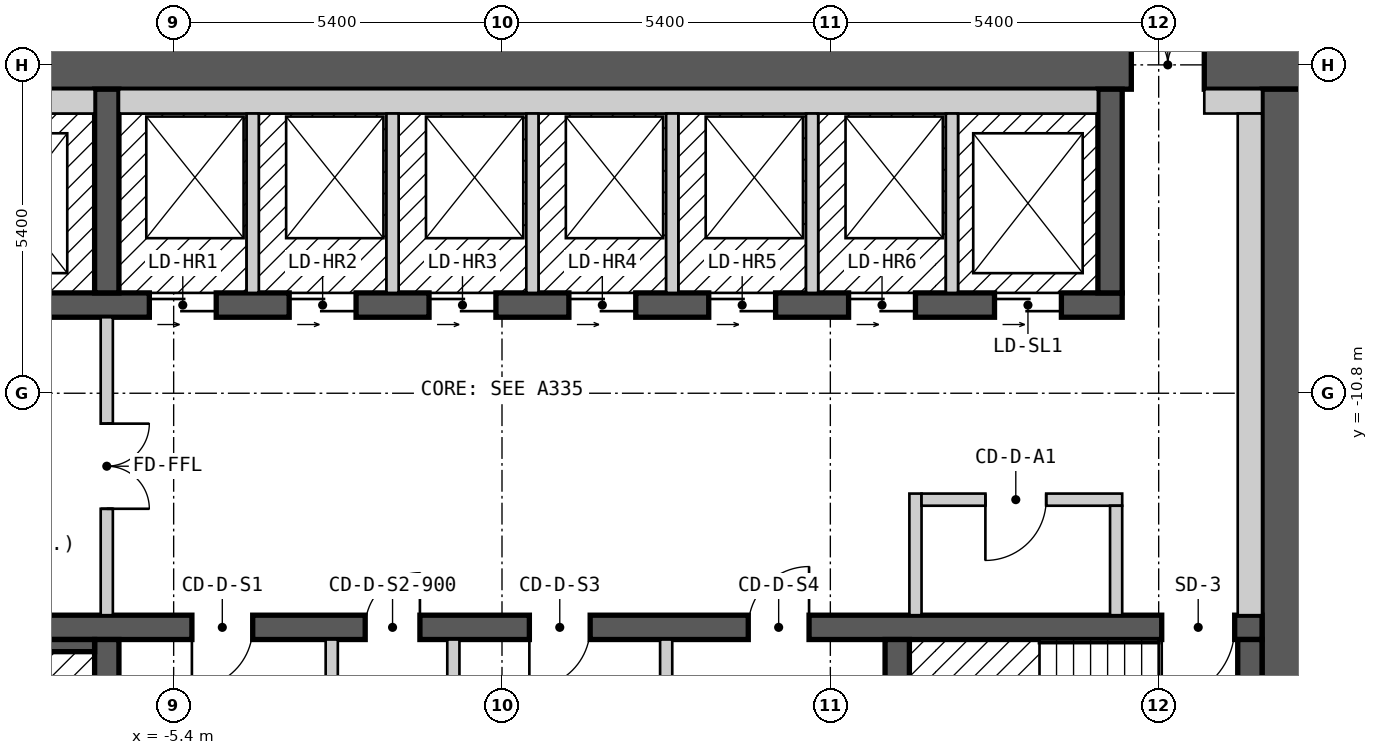
"""IFC4 building model, lengths in metres.
Left out: names, types, materials, properties, quantities, classifications, styles, units other than length and angle.
Written with IfcOpenShell. Run it as: python <this file> out.ifc"""

import sys

from ifc_helpers import new_model, si_unit, direction, frame, frame_2d, origin, place, context, subcontext, project, spatial, rectangle, extrude, element, fill, save


model = new_model("IFC4")
c1 = context("Model", 3, precision=1e-05, world=origin(), true_north=direction((0.0, 1.0)))
c2 = subcontext(c1, "Body", "Model", "MODEL_VIEW")
j1 = project(units=[si_unit("LENGTHUNIT", "METRE"), si_unit("PLANEANGLEUNIT", "RADIAN")], contexts=[c1])
p1 = place(None, origin())
s1 = spatial("IfcSite", under=j1, at=p1, CompositionType="ELEMENT")
p2 = place(p1, origin())
s2 = spatial("IfcBuilding", under=s1, at=p2, CompositionType="ELEMENT")
p3 = place(p2, frame((0.0, 0.0, 126.6)))
s3 = spatial("IfcBuildingStorey", under=s2, at=p3, CompositionType="ELEMENT", Elevation=126.6)
p4 = place(p3, frame((-13.3, -5.4, 0.0), z_axis=(0.0, 0.0, 1.0), x_axis=(1.0, 0.0, 0.0)))
e1 = element("IfcWall", 1, at=p4, inside=s3, PredefinedType="SHEAR", context=c2, shape_type="SweptSolid", body=[
    extrude(rectangle(XDim=26.6, YDim=0.8, at=frame_2d((13.3, 0.0))), origin(), (0.0, 0.0, 1.0), 2.7),
])
p5 = place(p4, frame((23.65, 0.0, 0.0)))
e2 = element("IfcOpeningElement", 2, at=p5, cuts=e1, PredefinedType="OPENING", context=c2, shape_type="SweptSolid", body=[
    extrude(rectangle(XDim=1.2, YDim=2.1, at=frame_2d((0.6, 1.05))), frame((0.0, 0.41, 0.0), z_axis=(0.0, -1.0, 0.0), x_axis=(1.0, 0.0, 0.0)), (0.0, 0.0, 1.0), 0.82),
])
p6 = place(p3, frame((12.9, -18.2, 0.0), z_axis=(0.0, 0.0, 1.0), x_axis=(0.0, 1.0, 0.0)))
e3 = element("IfcWall", 3, at=p6, inside=s3, PredefinedType="SHEAR", context=c2, shape_type="SweptSolid", body=[
    extrude(rectangle(XDim=12.4, YDim=0.8, at=frame_2d((6.2, 0.0))), origin(), (0.0, 0.0, 1.0), 2.7),
])
p7 = place(p3, frame((-12.5, -14.65, 0.0), z_axis=(0.0, 0.0, 1.0), x_axis=(1.0, 0.0, 0.0)))
e4 = element("IfcWall", 4, at=p7, inside=s3, PredefinedType="SHEAR", context=c2, shape_type="SweptSolid", body=[
    extrude(rectangle(XDim=25.0, YDim=0.4, at=frame_2d((12.5, 0.0))), origin(), (0.0, 0.0, 1.0), 2.7),
])
p8 = place(p7, frame((1.7, 0.0, 0.0), z_axis=(0.0, 0.0, 1.0), x_axis=(-1.0, 0.0, 0.0)))
e5 = element("IfcOpeningElement", 5, at=p8, cuts=e4, PredefinedType="OPENING", context=c2, shape_type="SweptSolid", body=[
    extrude(rectangle(XDim=1.2, YDim=2.1, at=frame_2d((0.6, 1.05))), frame((0.0, 0.21, 0.0), z_axis=(0.0, -1.0, 0.0), x_axis=(1.0, 0.0, 0.0)), (0.0, 0.0, 1.0), 0.42),
])
p9 = place(p7, frame((24.55, 0.0, 0.0), z_axis=(0.0, 0.0, 1.0), x_axis=(-1.0, 0.0, 0.0)))
e6 = element("IfcOpeningElement", 6, at=p9, cuts=e4, PredefinedType="OPENING", context=c2, shape_type="SweptSolid", body=[
    extrude(rectangle(XDim=1.2, YDim=2.1, at=frame_2d((0.6, 1.05))), frame((0.0, 0.21, 0.0), z_axis=(0.0, -1.0, 0.0), x_axis=(1.0, 0.0, 0.0)), (0.0, 0.0, 1.0), 0.42),
])
p10 = place(p7, frame((8.4, 0.0, 0.0), z_axis=(0.0, 0.0, 1.0), x_axis=(-1.0, 0.0, 0.0)))
e7 = element("IfcOpeningElement", 7, at=p10, cuts=e4, PredefinedType="OPENING", context=c2, shape_type="SweptSolid", body=[
    extrude(rectangle(XDim=1.0, YDim=2.1, at=frame_2d((0.5, 1.05))), frame((0.0, 0.21, 0.0), z_axis=(0.0, -1.0, 0.0), x_axis=(1.0, 0.0, 0.0)), (0.0, 0.0, 1.0), 0.42),
])
p11 = place(p7, frame((11.15, 0.0, 0.0), z_axis=(0.0, 0.0, 1.0), x_axis=(-1.0, 0.0, 0.0)))
e8 = element("IfcOpeningElement", 8, at=p11, cuts=e4, PredefinedType="OPENING", context=c2, shape_type="SweptSolid", body=[
    extrude(rectangle(XDim=0.9, YDim=2.1, at=frame_2d((0.45, 1.05))), frame((0.0, 0.21, 0.0), z_axis=(0.0, -1.0, 0.0), x_axis=(1.0, 0.0, 0.0)), (0.0, 0.0, 1.0), 0.42),
])
p12 = place(p7, frame((13.95, 0.0, 0.0), z_axis=(0.0, 0.0, 1.0), x_axis=(-1.0, 0.0, 0.0)))
e9 = element("IfcOpeningElement", 9, at=p12, cuts=e4, PredefinedType="OPENING", context=c2, shape_type="SweptSolid", body=[
    extrude(rectangle(XDim=1.0, YDim=2.1, at=frame_2d((0.5, 1.05))), frame((0.0, 0.21, 0.0), z_axis=(0.0, -1.0, 0.0), x_axis=(1.0, 0.0, 0.0)), (0.0, 0.0, 1.0), 0.42),
])
p13 = place(p7, frame((17.55, 0.0, 0.0), z_axis=(0.0, 0.0, 1.0), x_axis=(-1.0, 0.0, 0.0)))
e10 = element("IfcOpeningElement", 10, at=p13, cuts=e4, PredefinedType="OPENING", context=c2, shape_type="SweptSolid", body=[
    extrude(rectangle(XDim=1.0, YDim=2.1, at=frame_2d((0.5, 1.05))), frame((0.0, 0.21, 0.0), z_axis=(0.0, -1.0, 0.0), x_axis=(1.0, 0.0, 0.0)), (0.0, 0.0, 1.0), 0.42),
])
p14 = place(p3, frame((-12.5, -9.35, 0.0), z_axis=(0.0, 0.0, 1.0), x_axis=(1.0, 0.0, 0.0)))
e11 = element("IfcWall", 11, at=p14, inside=s3, PredefinedType="SHEAR", context=c2, shape_type="SweptSolid", body=[
    extrude(rectangle(XDim=22.7, YDim=0.4, at=frame_2d((11.35, 0.0))), origin(), (0.0, 0.0, 1.0), 2.7),
])
p15 = place(p14, frame((1.1, 0.0, 0.0)))
e12 = element("IfcOpeningElement", 12, at=p15, cuts=e11, PredefinedType="OPENING", context=c2, shape_type="SweptSolid", body=[
    extrude(rectangle(XDim=1.1, YDim=2.1, at=frame_2d((0.55, 1.05))), frame((0.0, 0.21, 0.0), z_axis=(0.0, -1.0, 0.0), x_axis=(1.0, 0.0, 0.0)), (0.0, 0.0, 1.0), 0.42),
])
p16 = place(p14, frame((3.9, 0.0, 0.0)))
e13 = element("IfcOpeningElement", 13, at=p16, cuts=e11, PredefinedType="OPENING", context=c2, shape_type="SweptSolid", body=[
    extrude(rectangle(XDim=1.1, YDim=2.1, at=frame_2d((0.55, 1.05))), frame((0.0, 0.21, 0.0), z_axis=(0.0, -1.0, 0.0), x_axis=(1.0, 0.0, 0.0)), (0.0, 0.0, 1.0), 0.42),
])
p17 = place(p14, frame((6.7, 0.0, 0.0)))
e14 = element("IfcOpeningElement", 14, at=p17, cuts=e11, PredefinedType="OPENING", context=c2, shape_type="SweptSolid", body=[
    extrude(rectangle(XDim=1.1, YDim=2.1, at=frame_2d((0.55, 1.05))), frame((0.0, 0.21, 0.0), z_axis=(0.0, -1.0, 0.0), x_axis=(1.0, 0.0, 0.0)), (0.0, 0.0, 1.0), 0.42),
])
p18 = place(p14, frame((9.0, 0.0, 0.0)))
e15 = element("IfcOpeningElement", 15, at=p18, cuts=e11, PredefinedType="OPENING", context=c2, shape_type="SweptSolid", body=[
    extrude(rectangle(XDim=1.1, YDim=2.1, at=frame_2d((0.55, 1.05))), frame((0.0, 0.21, 0.0), z_axis=(0.0, -1.0, 0.0), x_axis=(1.0, 0.0, 0.0)), (0.0, 0.0, 1.0), 0.42),
])
p19 = place(p14, frame((11.3, 0.0, 0.0)))
e16 = element("IfcOpeningElement", 16, at=p19, cuts=e11, PredefinedType="OPENING", context=c2, shape_type="SweptSolid", body=[
    extrude(rectangle(XDim=1.1, YDim=2.1, at=frame_2d((0.55, 1.05))), frame((0.0, 0.21, 0.0), z_axis=(0.0, -1.0, 0.0), x_axis=(1.0, 0.0, 0.0)), (0.0, 0.0, 1.0), 0.42),
])
p20 = place(p14, frame((13.6, 0.0, 0.0)))
e17 = element("IfcOpeningElement", 17, at=p20, cuts=e11, PredefinedType="OPENING", context=c2, shape_type="SweptSolid", body=[
    extrude(rectangle(XDim=1.1, YDim=2.1, at=frame_2d((0.55, 1.05))), frame((0.0, 0.21, 0.0), z_axis=(0.0, -1.0, 0.0), x_axis=(1.0, 0.0, 0.0)), (0.0, 0.0, 1.0), 0.42),
])
p21 = place(p14, frame((15.9, 0.0, 0.0)))
e18 = element("IfcOpeningElement", 18, at=p21, cuts=e11, PredefinedType="OPENING", context=c2, shape_type="SweptSolid", body=[
    extrude(rectangle(XDim=1.1, YDim=2.1, at=frame_2d((0.55, 1.05))), frame((0.0, 0.21, 0.0), z_axis=(0.0, -1.0, 0.0), x_axis=(1.0, 0.0, 0.0)), (0.0, 0.0, 1.0), 0.42),
])
p22 = place(p14, frame((18.2, 0.0, 0.0)))
e19 = element("IfcOpeningElement", 19, at=p22, cuts=e11, PredefinedType="OPENING", context=c2, shape_type="SweptSolid", body=[
    extrude(rectangle(XDim=1.1, YDim=2.1, at=frame_2d((0.55, 1.05))), frame((0.0, 0.21, 0.0), z_axis=(0.0, -1.0, 0.0), x_axis=(1.0, 0.0, 0.0)), (0.0, 0.0, 1.0), 0.42),
])
p23 = place(p14, frame((20.6, 0.0, 0.0)))
e20 = element("IfcOpeningElement", 20, at=p23, cuts=e11, PredefinedType="OPENING", context=c2, shape_type="SweptSolid", body=[
    extrude(rectangle(XDim=1.1, YDim=2.1, at=frame_2d((0.55, 1.05))), frame((0.0, 0.21, 0.0), z_axis=(0.0, -1.0, 0.0), x_axis=(1.0, 0.0, 0.0)), (0.0, 0.0, 1.0), 0.42),
])
for number, where, z_axis, x_axis in (
    (21, (-6.5, -18.2, 0.0), (0.0, 0.0, 1.0), (0.0, 1.0, 0.0)),
    (22, (6.5, -18.2, 0.0), (0.0, 0.0, 1.0), (0.0, 1.0, 0.0)),
    (23, (-6.5, -9.15, 0.0), (0.0, 0.0, 1.0), (0.0, 1.0, 0.0)),
    (24, (10.0, -9.15, 0.0), (0.0, 0.0, 1.0), (0.0, 1.0, 0.0)),
):
    element("IfcWall", number, at=place(p3, frame(where, z_axis=z_axis, x_axis=x_axis)), inside=s3, PredefinedType="SHEAR", context=c2, shape_type="SweptSolid", body=[
        extrude(rectangle(XDim=3.35, YDim=0.4, at=frame_2d((1.675, 0.0))), origin(), (0.0, 0.0, 1.0), 2.7),
    ])
p24 = place(p3, frame((-12.1, -6.0, 0.0), z_axis=(0.0, 0.0, 1.0), x_axis=(1.0, 0.0, 0.0)))
e25 = element("IfcWall", 25, at=p24, inside=s3, PredefinedType="SOLIDWALL", context=c2, shape_type="SweptSolid", body=[
    extrude(rectangle(XDim=5.4, YDim=0.4, at=frame_2d((2.7, 0.0))), origin(), (0.0, 0.0, 1.0), 2.7),
])
p25 = place(p3, frame((-10.8, -14.95, 0.0), z_axis=(0.0, 0.0, 1.0), x_axis=(1.0, 0.0, 0.0)))
e26 = element("IfcWall", 26, at=p25, inside=s3, PredefinedType="SOLIDWALL", context=c2, shape_type="SweptSolid", body=[
    extrude(rectangle(XDim=4.1, YDim=0.2, at=frame_2d((2.05, 0.0))), origin(), (0.0, 0.0, 1.0), 2.7),
])
p26 = place(p3, frame((-6.5, -14.45, 0.0), z_axis=(0.0, 0.0, 1.0), x_axis=(0.0, 1.0, 0.0)))
e27 = element("IfcWall", 27, at=p26, inside=s3, PredefinedType="PARTITIONING", context=c2, shape_type="SweptSolid", body=[
    extrude(rectangle(XDim=4.9, YDim=0.2, at=frame_2d((2.45, 0.0))), origin(), (0.0, 0.0, 1.0), 2.7),
])
p27 = place(p26, frame((3.15, 0.0, 0.0), z_axis=(0.0, 0.0, 1.0), x_axis=(-1.0, 0.0, 0.0)))
e28 = element("IfcOpeningElement", 28, at=p27, cuts=e27, PredefinedType="OPENING", context=c2, shape_type="SweptSolid", body=[
    extrude(rectangle(XDim=1.4, YDim=2.1, at=frame_2d((0.7, 1.05))), frame((0.0, 0.11, 0.0), z_axis=(0.0, -1.0, 0.0), x_axis=(1.0, 0.0, 0.0)), (0.0, 0.0, 1.0), 0.22),
])
p28 = place(p3, frame((-6.3, -6.0, 0.0), z_axis=(0.0, 0.0, 1.0), x_axis=(1.0, 0.0, 0.0)))
e29 = element("IfcWall", 29, at=p28, inside=s3, PredefinedType="SOLIDWALL", context=c2, shape_type="SweptSolid", body=[
    extrude(rectangle(XDim=16.1, YDim=0.4, at=frame_2d((8.05, 0.0))), origin(), (0.0, 0.0, 1.0), 2.7),
])
p29 = place(p3, frame((-4.1, -9.15, 0.0), z_axis=(0.0, 0.0, 1.0), x_axis=(0.0, 1.0, 0.0)))
e30 = element("IfcWall", 30, at=p29, inside=s3, PredefinedType="SOLIDWALL", context=c2, shape_type="SweptSolid", body=[
    extrude(rectangle(XDim=2.95, YDim=0.2, at=frame_2d((1.475, 0.0))), origin(), (0.0, 0.0, 1.0), 2.7),
])
p30 = place(p3, frame((-2.8, -17.8, 0.0), z_axis=(0.0, 0.0, 1.0), x_axis=(0.0, 1.0, 0.0)))
e31 = element("IfcWall", 31, at=p30, inside=s3, PredefinedType="PARTITIONING", context=c2, shape_type="SweptSolid", body=[
    extrude(rectangle(XDim=2.95, YDim=0.2, at=frame_2d((1.475, 0.0))), origin(), (0.0, 0.0, 1.0), 2.7),
])
p31 = place(p3, frame((-1.8, -9.15, 0.0), z_axis=(0.0, 0.0, 1.0), x_axis=(0.0, 1.0, 0.0)))
e32 = element("IfcWall", 32, at=p31, inside=s3, PredefinedType="SOLIDWALL", context=c2, shape_type="SweptSolid", body=[
    extrude(rectangle(XDim=2.95, YDim=0.2, at=frame_2d((1.475, 0.0))), origin(), (0.0, 0.0, 1.0), 2.7),
])
p32 = place(p3, frame((-0.8, -17.8, 0.0), z_axis=(0.0, 0.0, 1.0), x_axis=(0.0, 1.0, 0.0)))
e33 = element("IfcWall", 33, at=p32, inside=s3, PredefinedType="PARTITIONING", context=c2, shape_type="SweptSolid", body=[
    extrude(rectangle(XDim=2.95, YDim=0.2, at=frame_2d((1.475, 0.0))), origin(), (0.0, 0.0, 1.0), 2.7),
])
p33 = place(p3, frame((0.5, -9.15, 0.0), z_axis=(0.0, 0.0, 1.0), x_axis=(0.0, 1.0, 0.0)))
e34 = element("IfcWall", 34, at=p33, inside=s3, PredefinedType="SOLIDWALL", context=c2, shape_type="SweptSolid", body=[
    extrude(rectangle(XDim=2.95, YDim=0.2, at=frame_2d((1.475, 0.0))), origin(), (0.0, 0.0, 1.0), 2.7),
])
p34 = place(p3, frame((2.7, -17.8, 0.0), z_axis=(0.0, 0.0, 1.0), x_axis=(0.0, 1.0, 0.0)))
e35 = element("IfcWall", 35, at=p34, inside=s3, PredefinedType="PARTITIONING", context=c2, shape_type="SweptSolid", body=[
    extrude(rectangle(XDim=2.95, YDim=0.2, at=frame_2d((1.475, 0.0))), origin(), (0.0, 0.0, 1.0), 2.7),
])
for number, where, z_axis, x_axis in (
    (36, (2.8, -9.15, 0.0), (0.0, 0.0, 1.0), (0.0, 1.0, 0.0)),
    (37, (5.1, -9.15, 0.0), (0.0, 0.0, 1.0), (0.0, 1.0, 0.0)),
):
    element("IfcWall", number, at=place(p3, frame(where, z_axis=z_axis, x_axis=x_axis)), inside=s3, PredefinedType="SOLIDWALL", context=c2, shape_type="SweptSolid", body=[
        extrude(rectangle(XDim=2.95, YDim=0.2, at=frame_2d((1.475, 0.0))), origin(), (0.0, 0.0, 1.0), 2.7),
    ])
p35 = place(p3, frame((6.8, -14.45, 0.0), z_axis=(0.0, 0.0, 1.0), x_axis=(0.0, 1.0, 0.0)))
e38 = element("IfcWall", 38, at=p35, inside=s3, PredefinedType="PARTITIONING", context=c2, shape_type="SweptSolid", body=[
    extrude(rectangle(XDim=2.0, YDim=0.2, at=frame_2d((1.0, 0.0))), origin(), (0.0, 0.0, 1.0), 2.7),
])
p36 = place(p3, frame((6.9, -12.55, 0.0), z_axis=(0.0, 0.0, 1.0), x_axis=(1.0, 0.0, 0.0)))
e39 = element("IfcWall", 39, at=p36, inside=s3, PredefinedType="PARTITIONING", context=c2, shape_type="SweptSolid", body=[
    extrude(rectangle(XDim=3.3, YDim=0.2, at=frame_2d((1.65, 0.0))), origin(), (0.0, 0.0, 1.0), 2.7),
])
p37 = place(p36, frame((2.05, 0.0, 0.0), z_axis=(0.0, 0.0, 1.0), x_axis=(-1.0, 0.0, 0.0)))
e40 = element("IfcOpeningElement", 40, at=p37, cuts=e39, PredefinedType="OPENING", context=c2, shape_type="SweptSolid", body=[
    extrude(rectangle(XDim=1.0, YDim=2.1, at=frame_2d((0.5, 1.05))), frame((0.0, 0.11, 0.0), z_axis=(0.0, -1.0, 0.0), x_axis=(1.0, 0.0, 0.0)), (0.0, 0.0, 1.0), 0.22),
])
p38 = place(p3, frame((7.4, -9.15, 0.0), z_axis=(0.0, 0.0, 1.0), x_axis=(0.0, 1.0, 0.0)))
e41 = element("IfcWall", 41, at=p38, inside=s3, PredefinedType="SOLIDWALL", context=c2, shape_type="SweptSolid", body=[
    extrude(rectangle(XDim=2.95, YDim=0.2, at=frame_2d((1.475, 0.0))), origin(), (0.0, 0.0, 1.0), 2.7),
])
p39 = place(p3, frame((10.1, -14.45, 0.0), z_axis=(0.0, 0.0, 1.0), x_axis=(0.0, 1.0, 0.0)))
e42 = element("IfcWall", 42, at=p39, inside=s3, PredefinedType="PARTITIONING", context=c2, shape_type="SweptSolid", body=[
    extrude(rectangle(XDim=1.8, YDim=0.2, at=frame_2d((0.9, 0.0))), origin(), (0.0, 0.0, 1.0), 2.7),
])
p40 = place(p3, frame((11.55, -6.0, 0.0), z_axis=(0.0, 0.0, 1.0), x_axis=(1.0, 0.0, 0.0)))
e43 = element("IfcWall", 43, at=p40, inside=s3, PredefinedType="PARTITIONING", context=c2, shape_type="SweptSolid", body=[
    extrude(rectangle(XDim=0.95, YDim=0.4, at=frame_2d((0.475, 0.0))), origin(), (0.0, 0.0, 1.0), 2.7),
])
p41 = place(p3, frame((12.3, -17.6, 0.0), z_axis=(0.0, 0.0, 1.0), x_axis=(0.0, 1.0, 0.0)))
e44 = element("IfcWall", 44, at=p41, inside=s3, PredefinedType="SOLIDWALL", context=c2, shape_type="SweptSolid", body=[
    extrude(rectangle(XDim=2.75, YDim=0.4, at=frame_2d((1.375, 0.0))), origin(), (0.0, 0.0, 1.0), 2.7),
])
p42 = place(p3, frame((12.3, -14.45, 0.0), z_axis=(0.0, 0.0, 1.0), x_axis=(0.0, 1.0, 0.0)))
e45 = element("IfcWall", 45, at=p42, inside=s3, PredefinedType="PARTITIONING", context=c2, shape_type="SweptSolid", body=[
    extrude(rectangle(XDim=8.25, YDim=0.4, at=frame_2d((4.125, 0.0))), origin(), (0.0, 0.0, 1.0), 2.7),
])
p43 = place(p17, origin())
e46 = element("IfcDoor", 46, at=p43, inside=s3, OperationType="DOUBLE_DOOR_SLIDING", PredefinedType="DOOR", context=c2, shape_type="SweptSolid", body=[
    extrude(rectangle(XDim=1.1, YDim=2.1, at=frame_2d((0.55, 1.05))), frame((0.0, 0.025, 0.0), z_axis=(0.0, -1.0, 0.0), x_axis=(1.0, 0.0, 0.0)), (0.0, 0.0, 1.0), 0.05),
])
fill(e14, e46)
p44 = place(p18, origin())
e47 = element("IfcDoor", 47, at=p44, inside=s3, OperationType="DOUBLE_DOOR_SLIDING", PredefinedType="DOOR", context=c2, shape_type="SweptSolid", body=[
    extrude(rectangle(XDim=1.1, YDim=2.1, at=frame_2d((0.55, 1.05))), frame((0.0, 0.025, 0.0), z_axis=(0.0, -1.0, 0.0), x_axis=(1.0, 0.0, 0.0)), (0.0, 0.0, 1.0), 0.05),
])
fill(e15, e47)
p45 = place(p19, origin())
e48 = element("IfcDoor", 48, at=p45, inside=s3, OperationType="DOUBLE_DOOR_SLIDING", PredefinedType="DOOR", context=c2, shape_type="SweptSolid", body=[
    extrude(rectangle(XDim=1.1, YDim=2.1, at=frame_2d((0.55, 1.05))), frame((0.0, 0.025, 0.0), z_axis=(0.0, -1.0, 0.0), x_axis=(1.0, 0.0, 0.0)), (0.0, 0.0, 1.0), 0.05),
])
fill(e16, e48)
p46 = place(p20, origin())
e49 = element("IfcDoor", 49, at=p46, inside=s3, OperationType="DOUBLE_DOOR_SLIDING", PredefinedType="DOOR", context=c2, shape_type="SweptSolid", body=[
    extrude(rectangle(XDim=1.1, YDim=2.1, at=frame_2d((0.55, 1.05))), frame((0.0, 0.025, 0.0), z_axis=(0.0, -1.0, 0.0), x_axis=(1.0, 0.0, 0.0)), (0.0, 0.0, 1.0), 0.05),
])
fill(e17, e49)
p47 = place(p21, origin())
e50 = element("IfcDoor", 50, at=p47, inside=s3, OperationType="DOUBLE_DOOR_SLIDING", PredefinedType="DOOR", context=c2, shape_type="SweptSolid", body=[
    extrude(rectangle(XDim=1.1, YDim=2.1, at=frame_2d((0.55, 1.05))), frame((0.0, 0.025, 0.0), z_axis=(0.0, -1.0, 0.0), x_axis=(1.0, 0.0, 0.0)), (0.0, 0.0, 1.0), 0.05),
])
fill(e18, e50)
p48 = place(p22, origin())
e51 = element("IfcDoor", 51, at=p48, inside=s3, OperationType="DOUBLE_DOOR_SLIDING", PredefinedType="DOOR", context=c2, shape_type="SweptSolid", body=[
    extrude(rectangle(XDim=1.1, YDim=2.1, at=frame_2d((0.55, 1.05))), frame((0.0, 0.025, 0.0), z_axis=(0.0, -1.0, 0.0), x_axis=(1.0, 0.0, 0.0)), (0.0, 0.0, 1.0), 0.05),
])
fill(e19, e51)
p49 = place(p23, origin())
e52 = element("IfcDoor", 52, at=p49, inside=s3, OperationType="DOUBLE_DOOR_SLIDING", PredefinedType="DOOR", context=c2, shape_type="SweptSolid", body=[
    extrude(rectangle(XDim=1.1, YDim=2.1, at=frame_2d((0.55, 1.05))), frame((0.0, 0.025, 0.0), z_axis=(0.0, -1.0, 0.0), x_axis=(1.0, 0.0, 0.0)), (0.0, 0.0, 1.0), 0.05),
])
fill(e20, e52)
p50 = place(p9, origin())
e53 = element("IfcDoor", 53, at=p50, inside=s3, OperationType="SINGLE_SWING_RIGHT", PredefinedType="DOOR", context=c2, shape_type="SweptSolid", body=[
    extrude(rectangle(XDim=1.2, YDim=2.1, at=frame_2d((0.6, 1.05))), frame((0.0, 0.025, 0.0), z_axis=(0.0, -1.0, 0.0), x_axis=(1.0, 0.0, 0.0)), (0.0, 0.0, 1.0), 0.05),
])
fill(e6, e53)
p51 = place(p27, origin())
e54 = element("IfcDoor", 54, at=p51, inside=s3, OperationType="DOUBLE_DOOR_SINGLE_SWING", PredefinedType="DOOR", context=c2, shape_type="SweptSolid", body=[
    extrude(rectangle(XDim=1.4, YDim=2.1, at=frame_2d((0.7, 1.05))), frame((0.0, 0.025, 0.0), z_axis=(0.0, -1.0, 0.0), x_axis=(1.0, 0.0, 0.0)), (0.0, 0.0, 1.0), 0.05),
])
fill(e28, e54)
p52 = place(p5, origin())
e55 = element("IfcDoor", 55, at=p52, inside=s3, OperationType="DOUBLE_DOOR_SINGLE_SWING", PredefinedType="DOOR", context=c2, shape_type="SweptSolid", body=[
    extrude(rectangle(XDim=1.2, YDim=2.1, at=frame_2d((0.6, 1.05))), frame((0.0, 0.025, 0.0), z_axis=(0.0, -1.0, 0.0), x_axis=(1.0, 0.0, 0.0)), (0.0, 0.0, 1.0), 0.05),
])
fill(e2, e55)
p53 = place(p37, origin())
e56 = element("IfcDoor", 56, at=p53, inside=s3, OperationType="SINGLE_SWING_RIGHT", PredefinedType="DOOR", context=c2, shape_type="SweptSolid", body=[
    extrude(rectangle(XDim=1.0, YDim=2.1, at=frame_2d((0.5, 1.05))), frame((0.0, 0.025, 0.0), z_axis=(0.0, -1.0, 0.0), x_axis=(1.0, 0.0, 0.0)), (0.0, 0.0, 1.0), 0.05),
])
fill(e40, e56)
p54 = place(p10, origin())
e57 = element("IfcDoor", 57, at=p54, inside=s3, OperationType="SINGLE_SWING_RIGHT", PredefinedType="DOOR", context=c2, shape_type="SweptSolid", body=[
    extrude(rectangle(XDim=1.0, YDim=2.1, at=frame_2d((0.5, 1.05))), frame((0.0, 0.025, 0.0), z_axis=(0.0, -1.0, 0.0), x_axis=(1.0, 0.0, 0.0)), (0.0, 0.0, 1.0), 0.05),
])
fill(e7, e57)
p55 = place(p11, origin())
e58 = element("IfcDoor", 58, at=p55, inside=s3, OperationType="SINGLE_SWING_LEFT", PredefinedType="DOOR", context=c2, shape_type="SweptSolid", body=[
    extrude(rectangle(XDim=0.9, YDim=2.1, at=frame_2d((0.45, 1.05))), frame((0.0, 0.025, 0.0), z_axis=(0.0, -1.0, 0.0), x_axis=(1.0, 0.0, 0.0)), (0.0, 0.0, 1.0), 0.05),
])
fill(e8, e58)
p56 = place(p12, origin())
e59 = element("IfcDoor", 59, at=p56, inside=s3, OperationType="SINGLE_SWING_RIGHT", PredefinedType="DOOR", context=c2, shape_type="SweptSolid", body=[
    extrude(rectangle(XDim=1.0, YDim=2.1, at=frame_2d((0.5, 1.05))), frame((0.0, 0.025, 0.0), z_axis=(0.0, -1.0, 0.0), x_axis=(1.0, 0.0, 0.0)), (0.0, 0.0, 1.0), 0.05),
])
fill(e9, e59)
p57 = place(p13, origin())
e60 = element("IfcDoor", 60, at=p57, inside=s3, OperationType="SINGLE_SWING_LEFT", PredefinedType="DOOR", context=c2, shape_type="SweptSolid", body=[
    extrude(rectangle(XDim=1.0, YDim=2.1, at=frame_2d((0.5, 1.05))), frame((0.0, 0.025, 0.0), z_axis=(0.0, -1.0, 0.0), x_axis=(1.0, 0.0, 0.0)), (0.0, 0.0, 1.0), 0.05),
])
fill(e10, e60)
save(model, sys.argv[1])
